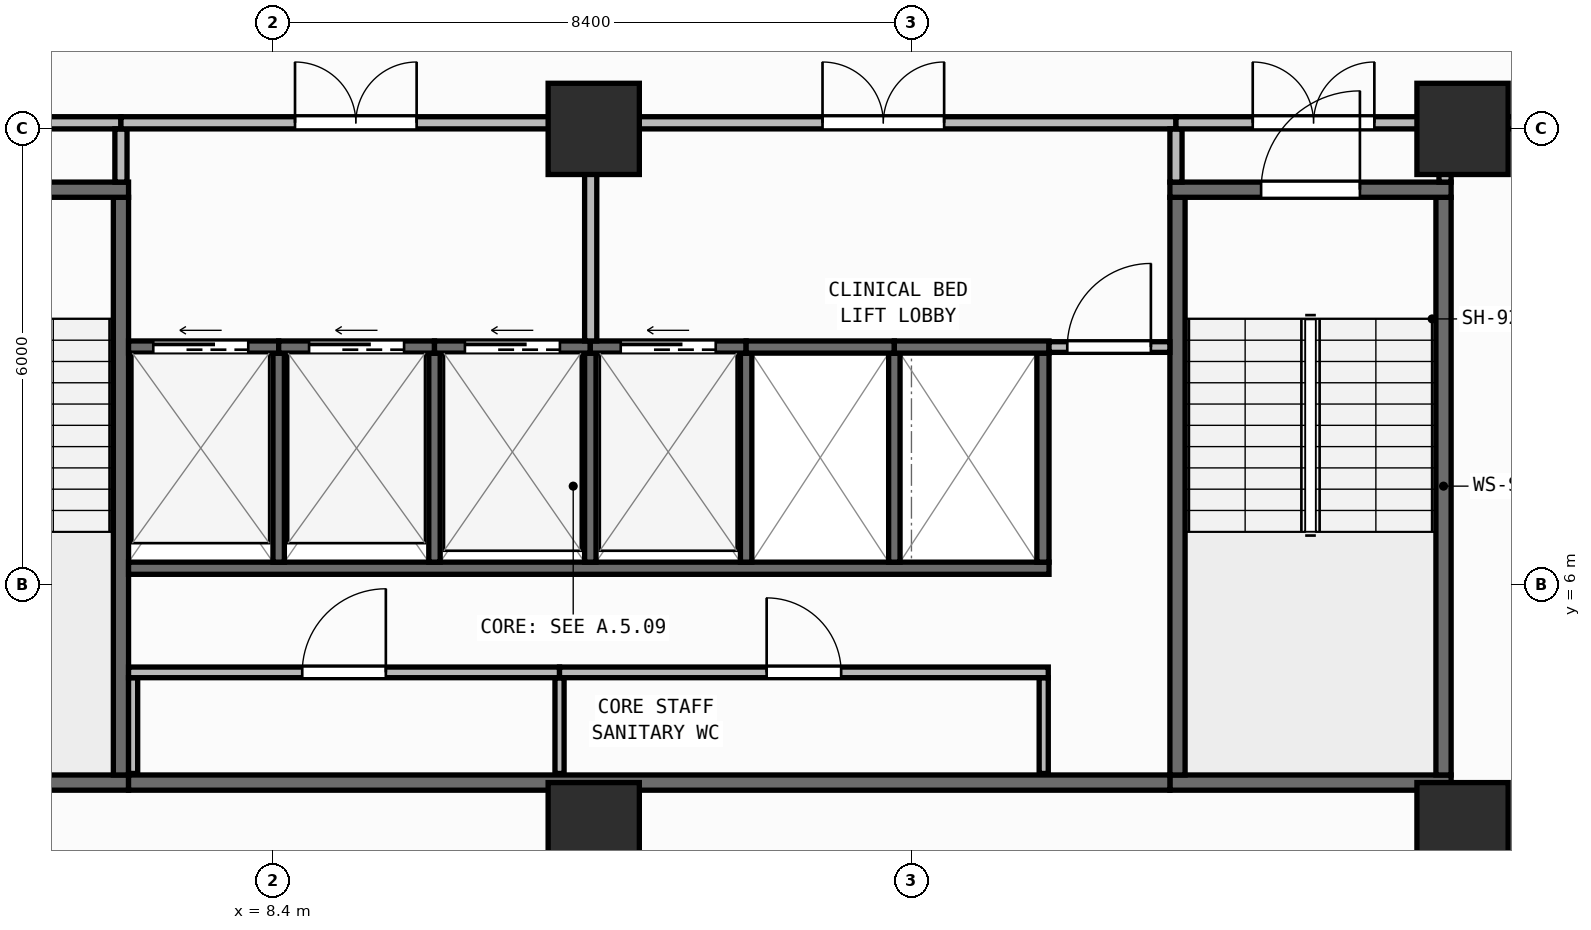
"""IFC4 building model, lengths in metres.
Left out: names, types, materials, properties, quantities, classifications, styles, units other than length and angle.
Written with IfcOpenShell. Run it as: python <this file> out.ifc"""

import sys

from ifc_helpers import new_model, si_unit, direction, frame, frame_2d, origin, origin_2d, place, context, subcontext, project, spatial, rectangle, extrude, element, fill, save


model = new_model("IFC4")
c1 = context("Model", 3, precision=1e-05, world=origin(), true_north=direction((0.0, 1.0)))
c2 = subcontext(c1, "Body", "Model", "MODEL_VIEW")
j1 = project(units=[si_unit("LENGTHUNIT", "METRE"), si_unit("PLANEANGLEUNIT", "RADIAN")], contexts=[c1])
p1 = place(None, origin())
s1 = spatial("IfcSite", under=j1, at=p1, CompositionType="ELEMENT")
p2 = place(p1, origin())
s2 = spatial("IfcBuilding", under=s1, at=p2, CompositionType="ELEMENT")
p3 = place(p2, frame((0.0, 0.0, 138.9)))
s3 = spatial("IfcBuildingStorey", under=s2, at=p3, CompositionType="ELEMENT", Elevation=138.9)
for number, where, z_axis, x_axis in (
    (1, (12.62, 2.8, 0.0), (0.0, 0.0, 1.0), (1.0, 0.0, 0.0)),
    (2, (24.05, 2.8, 0.0), (0.0, 0.0, 1.0), (1.0, 0.0, 0.0)),
    (3, (12.62, 12.0, 0.0), (0.0, 0.0, 1.0), (1.0, 0.0, 0.0)),
    (4, (24.05, 12.0, 0.0), (0.0, 0.0, 1.0), (1.0, 0.0, 0.0)),
):
    element("IfcColumn", number, at=place(p3, frame(where, z_axis=z_axis, x_axis=x_axis)), inside=s3, PredefinedType="COLUMN", context=c2, shape_type="SweptSolid", body=[
        extrude(rectangle(XDim=1.2, YDim=1.2, at=origin_2d()), origin(), (0.0, 0.0, 1.0), 3.95),
    ])
p4 = place(p3, frame((2.76, 0.173, 0.0), z_axis=(0.0, 0.0, 1.0), x_axis=(0.996857931723, 0.079210251617, 0.0)))
e5 = element("IfcWall", 5, at=p4, inside=s3, PredefinedType="STANDARD", context=c2, shape_type="SweptSolid", body=[
    extrude(rectangle(XDim=51.442, YDim=0.26, at=frame_2d((25.721, 0.0))), origin(), (0.0, 0.0, 1.0), 3.71),
])
p5 = place(p4, frame((24.521, 0.0, 0.9)))
e6 = element("IfcOpeningElement", 6, at=p5, cuts=e5, PredefinedType="OPENING", context=c2, shape_type="SweptSolid", body=[
    extrude(rectangle(XDim=2.4, YDim=1.65, at=frame_2d((1.2, 0.825))), frame((0.0, 0.14, 0.0), z_axis=(0.0, -1.0, 0.0), x_axis=(1.0, 0.0, 0.0)), (0.0, 0.0, 1.0), 0.28),
])
p6 = place(p3, frame((2.8, 3.4, 0.0), z_axis=(0.0, 0.0, 1.0), x_axis=(1.0, 0.0, 0.0)))
e7 = element("IfcWall", 7, at=p6, inside=s3, PredefinedType="SHEAR", context=c2, shape_type="SweptSolid", body=[
    extrude(rectangle(XDim=3.7, YDim=0.2, at=frame_2d((1.85, 0.0))), origin(), (0.0, 0.0, 1.0), 3.71),
])
p7 = place(p3, frame((6.4, 3.5, 0.0), z_axis=(0.0, 0.0, 1.0), x_axis=(0.0, 1.0, 0.0)))
e8 = element("IfcWall", 8, at=p7, inside=s3, PredefinedType="SHEAR", context=c2, shape_type="SweptSolid", body=[
    extrude(rectangle(XDim=7.6, YDim=0.2, at=frame_2d((3.8, 0.0))), origin(), (0.0, 0.0, 1.0), 3.71),
])
p8 = place(p3, frame((2.8, 11.2, 0.0), z_axis=(0.0, 0.0, 1.0), x_axis=(1.0, 0.0, 0.0)))
e9 = element("IfcWall", 9, at=p8, inside=s3, PredefinedType="SHEAR", context=c2, shape_type="SweptSolid", body=[
    extrude(rectangle(XDim=3.7, YDim=0.2, at=frame_2d((1.85, 0.0))), origin(), (0.0, 0.0, 1.0), 3.71),
])
p9 = place(p8, frame((1.2, 0.0, 0.0)))
e10 = element("IfcOpeningElement", 10, at=p9, cuts=e9, PredefinedType="OPENING", context=c2, shape_type="SweptSolid", body=[
    extrude(rectangle(XDim=1.3, YDim=2.15, at=frame_2d((0.65, 1.075))), frame((0.0, 0.11, 0.0), z_axis=(0.0, -1.0, 0.0), x_axis=(1.0, 0.0, 0.0)), (0.0, 0.0, 1.0), 0.22),
])
p10 = place(p3, frame((20.2, 3.4, 0.0), z_axis=(0.0, 0.0, 1.0), x_axis=(1.0, 0.0, 0.0)))
e11 = element("IfcWall", 11, at=p10, inside=s3, PredefinedType="SHEAR", context=c2, shape_type="SweptSolid", body=[
    extrude(rectangle(XDim=3.7, YDim=0.2, at=frame_2d((1.85, 0.0))), origin(), (0.0, 0.0, 1.0), 3.71),
])
for number, where, z_axis, x_axis in (
    (12, (20.3, 3.5, 0.0), (0.0, 0.0, 1.0), (0.0, 1.0, 0.0)),
    (13, (23.8, 3.5, 0.0), (0.0, 0.0, 1.0), (0.0, 1.0, 0.0)),
):
    element("IfcWall", number, at=place(p3, frame(where, z_axis=z_axis, x_axis=x_axis)), inside=s3, PredefinedType="SHEAR", context=c2, shape_type="SweptSolid", body=[
        extrude(rectangle(XDim=7.6, YDim=0.2, at=frame_2d((3.8, 0.0))), origin(), (0.0, 0.0, 1.0), 3.71),
    ])
p11 = place(p3, frame((20.2, 11.2, 0.0), z_axis=(0.0, 0.0, 1.0), x_axis=(1.0, 0.0, 0.0)))
e14 = element("IfcWall", 14, at=p11, inside=s3, PredefinedType="SHEAR", context=c2, shape_type="SweptSolid", body=[
    extrude(rectangle(XDim=3.7, YDim=0.2, at=frame_2d((1.85, 0.0))), origin(), (0.0, 0.0, 1.0), 3.71),
])
p12 = place(p11, frame((1.2, 0.0, 0.0)))
e15 = element("IfcOpeningElement", 15, at=p12, cuts=e14, PredefinedType="OPENING", context=c2, shape_type="SweptSolid", body=[
    extrude(rectangle(XDim=1.3, YDim=2.15, at=frame_2d((0.65, 1.075))), frame((0.0, 0.11, 0.0), z_axis=(0.0, -1.0, 0.0), x_axis=(1.0, 0.0, 0.0)), (0.0, 0.0, 1.0), 0.22),
])
p13 = place(p3, frame((6.5, 3.4, 0.0), z_axis=(0.0, 0.0, 1.0), x_axis=(1.0, 0.0, 0.0)))
e16 = element("IfcWall", 16, at=p13, inside=s3, PredefinedType="SHEAR", context=c2, shape_type="SweptSolid", body=[
    extrude(rectangle(XDim=13.7, YDim=0.2, at=frame_2d((6.85, 0.0))), origin(), (0.0, 0.0, 1.0), 3.71),
])
p14 = place(p3, frame((6.5, 6.22, 0.0), z_axis=(0.0, 0.0, 1.0), x_axis=(1.0, 0.0, 0.0)))
e17 = element("IfcWall", 17, at=p14, inside=s3, PredefinedType="SHEAR", context=c2, shape_type="SweptSolid", body=[
    extrude(rectangle(XDim=12.11, YDim=0.16, at=frame_2d((6.055, 0.0))), origin(), (0.0, 0.0, 1.0), 3.71),
])
p15 = place(p3, frame((18.53, 6.3, 0.0), z_axis=(0.0, 0.0, 1.0), x_axis=(0.0, 1.0, 0.0)))
e18 = element("IfcWall", 18, at=p15, inside=s3, PredefinedType="SHEAR", context=c2, shape_type="SweptSolid", body=[
    extrude(rectangle(XDim=2.75, YDim=0.16, at=frame_2d((1.375, 0.0))), origin(), (0.0, 0.0, 1.0), 3.71),
])
for number, where, z_axis, x_axis in (
    (19, (8.475, 6.3, 0.0), (0.0, 0.0, 1.0), (0.0, 1.0, 0.0)),
    (20, (10.525, 6.3, 0.0), (0.0, 0.0, 1.0), (0.0, 1.0, 0.0)),
    (21, (12.575, 6.3, 0.0), (0.0, 0.0, 1.0), (0.0, 1.0, 0.0)),
    (22, (14.625, 6.3, 0.0), (0.0, 0.0, 1.0), (0.0, 1.0, 0.0)),
    (23, (16.575, 6.3, 0.0), (0.0, 0.0, 1.0), (0.0, 1.0, 0.0)),
):
    element("IfcWall", number, at=place(p3, frame(where, z_axis=z_axis, x_axis=x_axis)), inside=s3, PredefinedType="SHEAR", context=c2, shape_type="SweptSolid", body=[
        extrude(rectangle(XDim=2.75, YDim=0.15, at=frame_2d((1.375, 0.0))), origin(), (0.0, 0.0, 1.0), 3.71),
    ])
p16 = place(p3, frame((6.5, 9.13, 0.0), z_axis=(0.0, 0.0, 1.0), x_axis=(1.0, 0.0, 0.0)))
e24 = element("IfcWall", 24, at=p16, inside=s3, PredefinedType="SHEAR", context=c2, shape_type="SweptSolid", body=[
    extrude(rectangle(XDim=1.975, YDim=0.16, at=frame_2d((0.988, 0.0))), origin(), (0.0, 0.0, 1.0), 3.71),
])
p17 = place(p16, frame((0.325, 0.0, 0.0)))
e25 = element("IfcOpeningElement", 25, at=p17, cuts=e24, PredefinedType="OPENING", context=c2, shape_type="SweptSolid", body=[
    extrude(rectangle(XDim=1.25, YDim=2.15, at=frame_2d((0.625, 1.075))), frame((0.0, 0.09, 0.0), z_axis=(0.0, -1.0, 0.0), x_axis=(1.0, 0.0, 0.0)), (0.0, 0.0, 1.0), 0.18),
])
p18 = place(p3, frame((8.475, 9.13, 0.0), z_axis=(0.0, 0.0, 1.0), x_axis=(1.0, 0.0, 0.0)))
e26 = element("IfcWall", 26, at=p18, inside=s3, PredefinedType="SHEAR", context=c2, shape_type="SweptSolid", body=[
    extrude(rectangle(XDim=2.05, YDim=0.16, at=frame_2d((1.025, 0.0))), origin(), (0.0, 0.0, 1.0), 3.71),
])
p19 = place(p18, frame((0.4, 0.0, 0.0)))
e27 = element("IfcOpeningElement", 27, at=p19, cuts=e26, PredefinedType="OPENING", context=c2, shape_type="SweptSolid", body=[
    extrude(rectangle(XDim=1.25, YDim=2.15, at=frame_2d((0.625, 1.075))), frame((0.0, 0.09, 0.0), z_axis=(0.0, -1.0, 0.0), x_axis=(1.0, 0.0, 0.0)), (0.0, 0.0, 1.0), 0.18),
])
p20 = place(p3, frame((10.525, 9.13, 0.0), z_axis=(0.0, 0.0, 1.0), x_axis=(1.0, 0.0, 0.0)))
e28 = element("IfcWall", 28, at=p20, inside=s3, PredefinedType="SHEAR", context=c2, shape_type="SweptSolid", body=[
    extrude(rectangle(XDim=2.05, YDim=0.16, at=frame_2d((1.025, 0.0))), origin(), (0.0, 0.0, 1.0), 3.71),
])
p21 = place(p20, frame((0.4, 0.0, 0.0)))
e29 = element("IfcOpeningElement", 29, at=p21, cuts=e28, PredefinedType="OPENING", context=c2, shape_type="SweptSolid", body=[
    extrude(rectangle(XDim=1.25, YDim=2.15, at=frame_2d((0.625, 1.075))), frame((0.0, 0.09, 0.0), z_axis=(0.0, -1.0, 0.0), x_axis=(1.0, 0.0, 0.0)), (0.0, 0.0, 1.0), 0.18),
])
p22 = place(p3, frame((12.575, 9.13, 0.0), z_axis=(0.0, 0.0, 1.0), x_axis=(1.0, 0.0, 0.0)))
e30 = element("IfcWall", 30, at=p22, inside=s3, PredefinedType="SHEAR", context=c2, shape_type="SweptSolid", body=[
    extrude(rectangle(XDim=2.05, YDim=0.16, at=frame_2d((1.025, 0.0))), origin(), (0.0, 0.0, 1.0), 3.71),
])
p23 = place(p22, frame((0.4, 0.0, 0.0)))
e31 = element("IfcOpeningElement", 31, at=p23, cuts=e30, PredefinedType="OPENING", context=c2, shape_type="SweptSolid", body=[
    extrude(rectangle(XDim=1.25, YDim=2.15, at=frame_2d((0.625, 1.075))), frame((0.0, 0.09, 0.0), z_axis=(0.0, -1.0, 0.0), x_axis=(1.0, 0.0, 0.0)), (0.0, 0.0, 1.0), 0.18),
])
p24 = place(p3, frame((14.625, 9.13, 0.0), z_axis=(0.0, 0.0, 1.0), x_axis=(1.0, 0.0, 0.0)))
e32 = element("IfcWall", 32, at=p24, inside=s3, PredefinedType="SHEAR", context=c2, shape_type="SweptSolid", body=[
    extrude(rectangle(XDim=1.95, YDim=0.16, at=frame_2d((0.975, 0.0))), origin(), (0.0, 0.0, 1.0), 3.71),
])
p25 = place(p3, frame((16.575, 9.13, 0.0), z_axis=(0.0, 0.0, 1.0), x_axis=(1.0, 0.0, 0.0)))
e33 = element("IfcWall", 33, at=p25, inside=s3, PredefinedType="SHEAR", context=c2, shape_type="SweptSolid", body=[
    extrude(rectangle(XDim=2.035, YDim=0.16, at=frame_2d((1.018, 0.0))), origin(), (0.0, 0.0, 1.0), 3.71),
])
for number, where, z_axis, x_axis in (
    (34, (6.56, 3.52, 0.0), (0.0, 0.0, 1.0), (0.0, 1.0, 0.0)),
    (35, (12.17, 3.52, 0.0), (0.0, 0.0, 1.0), (0.0, 1.0, 0.0)),
    (36, (18.54, 3.52, 0.0), (0.0, 0.0, 1.0), (0.0, 1.0, 0.0)),
):
    element("IfcWall", number, at=place(p3, frame(where, z_axis=z_axis, x_axis=x_axis)), inside=s3, PredefinedType="PARTITIONING", context=c2, shape_type="SweptSolid", body=[
        extrude(rectangle(XDim=1.26, YDim=0.12, at=frame_2d((0.63, 0.0))), origin(), (0.0, 0.0, 1.0), 3.71),
    ])
p26 = place(p3, frame((6.5, 4.85, 0.0), z_axis=(0.0, 0.0, 1.0), x_axis=(1.0, 0.0, 0.0)))
e37 = element("IfcWall", 37, at=p26, inside=s3, PredefinedType="PARTITIONING", context=c2, shape_type="SweptSolid", body=[
    extrude(rectangle(XDim=5.67, YDim=0.14, at=frame_2d((2.835, 0.0))), origin(), (0.0, 0.0, 1.0), 3.71),
])
p27 = place(p26, frame((2.285, 0.0, 0.0)))
e38 = element("IfcOpeningElement", 38, at=p27, cuts=e37, PredefinedType="OPENING", context=c2, shape_type="SweptSolid", body=[
    extrude(rectangle(XDim=1.1, YDim=2.1, at=frame_2d((0.55, 1.05))), frame((0.0, 0.08, 0.0), z_axis=(0.0, -1.0, 0.0), x_axis=(1.0, 0.0, 0.0)), (0.0, 0.0, 1.0), 0.16),
])
p28 = place(p3, frame((12.17, 4.85, 0.0), z_axis=(0.0, 0.0, 1.0), x_axis=(1.0, 0.0, 0.0)))
e39 = element("IfcWall", 39, at=p28, inside=s3, PredefinedType="PARTITIONING", context=c2, shape_type="SweptSolid", body=[
    extrude(rectangle(XDim=6.43, YDim=0.14, at=frame_2d((3.215, 0.0))), origin(), (0.0, 0.0, 1.0), 3.71),
])
p29 = place(p28, frame((2.725, 0.0, 0.0)))
e40 = element("IfcOpeningElement", 40, at=p29, cuts=e39, PredefinedType="OPENING", context=c2, shape_type="SweptSolid", body=[
    extrude(rectangle(XDim=0.98, YDim=2.1, at=frame_2d((0.49, 1.05))), frame((0.0, 0.08, 0.0), z_axis=(0.0, -1.0, 0.0), x_axis=(1.0, 0.0, 0.0)), (0.0, 0.0, 1.0), 0.16),
])
p30 = place(p3, frame((18.61, 9.13, 0.0), z_axis=(0.0, 0.0, 1.0), x_axis=(1.0, 0.0, 0.0)))
e41 = element("IfcWall", 41, at=p30, inside=s3, PredefinedType="PARTITIONING", context=c2, shape_type="SweptSolid", body=[
    extrude(rectangle(XDim=1.59, YDim=0.14, at=frame_2d((0.795, 0.0))), origin(), (0.0, 0.0, 1.0), 3.71),
])
p31 = place(p30, frame((0.24, 0.0, 0.0)))
e42 = element("IfcOpeningElement", 42, at=p31, cuts=e41, PredefinedType="OPENING", context=c2, shape_type="SweptSolid", body=[
    extrude(rectangle(XDim=1.1, YDim=2.1, at=frame_2d((0.55, 1.05))), frame((0.0, 0.08, 0.0), z_axis=(0.0, -1.0, 0.0), x_axis=(1.0, 0.0, 0.0)), (0.0, 0.0, 1.0), 0.16),
])
p32 = place(p3, frame((2.8, 12.08, 0.0), z_axis=(0.0, 0.0, 1.0), x_axis=(1.0, 0.0, 0.0)))
e43 = element("IfcWall", 43, at=p32, inside=s3, PredefinedType="PARTITIONING", context=c2, shape_type="SweptSolid", body=[
    extrude(rectangle(XDim=3.6, YDim=0.16, at=frame_2d((1.8, 0.0))), origin(), (0.0, 0.0, 1.0), 3.083),
])
p33 = place(p32, frame((1.0, 0.0, 0.0)))
e44 = element("IfcOpeningElement", 44, at=p33, cuts=e43, PredefinedType="OPENING", context=c2, shape_type="SweptSolid", body=[
    extrude(rectangle(XDim=1.6, YDim=2.05, at=frame_2d((0.8, 1.025))), frame((0.0, 0.09, 0.0), z_axis=(0.0, -1.0, 0.0), x_axis=(1.0, 0.0, 0.0)), (0.0, 0.0, 1.0), 0.18),
])
p34 = place(p3, frame((6.4, 11.3, 0.0), z_axis=(0.0, 0.0, 1.0), x_axis=(0.0, 1.0, 0.0)))
e45 = element("IfcWall", 45, at=p34, inside=s3, PredefinedType="PARTITIONING", context=c2, shape_type="SweptSolid", body=[
    extrude(rectangle(XDim=0.7, YDim=0.16, at=frame_2d((0.35, 0.0))), origin(), (0.0, 0.0, 1.0), 3.71),
])
p35 = place(p3, frame((6.4, 12.08, 0.0), z_axis=(0.0, 0.0, 1.0), x_axis=(1.0, 0.0, 0.0)))
e46 = element("IfcWall", 46, at=p35, inside=s3, PredefinedType="PARTITIONING", context=c2, shape_type="SweptSolid", body=[
    extrude(rectangle(XDim=6.18, YDim=0.16, at=frame_2d((3.09, 0.0))), origin(), (0.0, 0.0, 1.0), 3.083),
])
p36 = place(p35, frame((2.29, 0.0, 0.0)))
e47 = element("IfcOpeningElement", 47, at=p36, cuts=e46, PredefinedType="OPENING", context=c2, shape_type="SweptSolid", body=[
    extrude(rectangle(XDim=1.6, YDim=2.05, at=frame_2d((0.8, 1.025))), frame((0.0, 0.09, 0.0), z_axis=(0.0, -1.0, 0.0), x_axis=(1.0, 0.0, 0.0)), (0.0, 0.0, 1.0), 0.18),
])
p37 = place(p3, frame((12.58, 9.21, 0.0), z_axis=(0.0, 0.0, 1.0), x_axis=(0.0, 1.0, 0.0)))
e48 = element("IfcWall", 48, at=p37, inside=s3, PredefinedType="PARTITIONING", context=c2, shape_type="SweptSolid", body=[
    extrude(rectangle(XDim=2.79, YDim=0.16, at=frame_2d((1.395, 0.0))), origin(), (0.0, 0.0, 1.0), 3.71),
])
p38 = place(p3, frame((12.58, 12.08, 0.0), z_axis=(0.0, 0.0, 1.0), x_axis=(1.0, 0.0, 0.0)))
e49 = element("IfcWall", 49, at=p38, inside=s3, PredefinedType="PARTITIONING", context=c2, shape_type="SweptSolid", body=[
    extrude(rectangle(XDim=7.7, YDim=0.16, at=frame_2d((3.85, 0.0))), origin(), (0.0, 0.0, 1.0), 3.083),
])
p39 = place(p38, frame((3.05, 0.0, 0.0)))
e50 = element("IfcOpeningElement", 50, at=p39, cuts=e49, PredefinedType="OPENING", context=c2, shape_type="SweptSolid", body=[
    extrude(rectangle(XDim=1.6, YDim=2.05, at=frame_2d((0.8, 1.025))), frame((0.0, 0.09, 0.0), z_axis=(0.0, -1.0, 0.0), x_axis=(1.0, 0.0, 0.0)), (0.0, 0.0, 1.0), 0.18),
])
p40 = place(p3, frame((20.28, 11.3, 0.0), z_axis=(0.0, 0.0, 1.0), x_axis=(0.0, 1.0, 0.0)))
e51 = element("IfcWall", 51, at=p40, inside=s3, PredefinedType="PARTITIONING", context=c2, shape_type="SweptSolid", body=[
    extrude(rectangle(XDim=0.7, YDim=0.16, at=frame_2d((0.35, 0.0))), origin(), (0.0, 0.0, 1.0), 3.71),
])
p41 = place(p3, frame((20.28, 12.08, 0.0), z_axis=(0.0, 0.0, 1.0), x_axis=(1.0, 0.0, 0.0)))
e52 = element("IfcWall", 52, at=p41, inside=s3, PredefinedType="PARTITIONING", context=c2, shape_type="SweptSolid", body=[
    extrude(rectangle(XDim=3.62, YDim=0.16, at=frame_2d((1.81, 0.0))), origin(), (0.0, 0.0, 1.0), 3.083),
])
p42 = place(p41, frame((1.01, 0.0, 0.0)))
e53 = element("IfcOpeningElement", 53, at=p42, cuts=e52, PredefinedType="OPENING", context=c2, shape_type="SweptSolid", body=[
    extrude(rectangle(XDim=1.6, YDim=2.05, at=frame_2d((0.8, 1.025))), frame((0.0, 0.09, 0.0), z_axis=(0.0, -1.0, 0.0), x_axis=(1.0, 0.0, 0.0)), (0.0, 0.0, 1.0), 0.18),
])
p43 = place(p3, frame((23.82, 11.3, 0.0), z_axis=(0.0, 0.0, 1.0), x_axis=(0.0, 1.0, 0.0)))
e54 = element("IfcWall", 54, at=p43, inside=s3, PredefinedType="PARTITIONING", context=c2, shape_type="SweptSolid", body=[
    extrude(rectangle(XDim=0.7, YDim=0.16, at=frame_2d((0.35, 0.0))), origin(), (0.0, 0.0, 1.0), 3.71),
])
p44 = place(p3, frame((24.02, 12.08, 0.0), z_axis=(0.0, 0.0, 1.0), x_axis=(1.0, 0.0, 0.0)))
e55 = element("IfcWall", 55, at=p44, inside=s3, PredefinedType="PARTITIONING", context=c2, shape_type="SweptSolid", body=[
    extrude(rectangle(XDim=1.245, YDim=0.16, at=frame_2d((0.623, 0.0))), origin(), (0.0, 0.0, 1.0), 3.083),
])
p45 = place(p12, origin())
e56 = element("IfcDoor", 56, at=p45, inside=s3, OperationType="SINGLE_SWING_RIGHT", PredefinedType="DOOR", context=c2, shape_type="SweptSolid", body=[
    extrude(rectangle(XDim=1.3, YDim=2.15, at=frame_2d((0.65, 1.075))), frame((0.0, 0.025, 0.0), z_axis=(0.0, -1.0, 0.0), x_axis=(1.0, 0.0, 0.0)), (0.0, 0.0, 1.0), 0.05),
])
fill(e15, e56)
p46 = place(p17, origin())
e57 = element("IfcDoor", 57, at=p46, inside=s3, OperationType="SLIDING_TO_LEFT", PredefinedType="DOOR", context=c2, shape_type="SweptSolid", body=[
    extrude(rectangle(XDim=1.25, YDim=2.15, at=frame_2d((0.625, 1.075))), frame((0.0, 0.025, 0.0), z_axis=(0.0, -1.0, 0.0), x_axis=(1.0, 0.0, 0.0)), (0.0, 0.0, 1.0), 0.05),
])
fill(e25, e57)
p47 = place(p19, origin())
e58 = element("IfcDoor", 58, at=p47, inside=s3, OperationType="SLIDING_TO_LEFT", PredefinedType="DOOR", context=c2, shape_type="SweptSolid", body=[
    extrude(rectangle(XDim=1.25, YDim=2.15, at=frame_2d((0.625, 1.075))), frame((0.0, 0.025, 0.0), z_axis=(0.0, -1.0, 0.0), x_axis=(1.0, 0.0, 0.0)), (0.0, 0.0, 1.0), 0.05),
])
fill(e27, e58)
p48 = place(p21, origin())
e59 = element("IfcDoor", 59, at=p48, inside=s3, OperationType="SLIDING_TO_LEFT", PredefinedType="DOOR", context=c2, shape_type="SweptSolid", body=[
    extrude(rectangle(XDim=1.25, YDim=2.15, at=frame_2d((0.625, 1.075))), frame((0.0, 0.025, 0.0), z_axis=(0.0, -1.0, 0.0), x_axis=(1.0, 0.0, 0.0)), (0.0, 0.0, 1.0), 0.05),
])
fill(e29, e59)
p49 = place(p23, origin())
e60 = element("IfcDoor", 60, at=p49, inside=s3, OperationType="SLIDING_TO_LEFT", PredefinedType="DOOR", context=c2, shape_type="SweptSolid", body=[
    extrude(rectangle(XDim=1.25, YDim=2.15, at=frame_2d((0.625, 1.075))), frame((0.0, 0.025, 0.0), z_axis=(0.0, -1.0, 0.0), x_axis=(1.0, 0.0, 0.0)), (0.0, 0.0, 1.0), 0.05),
])
fill(e31, e60)
p50 = place(p27, origin())
e61 = element("IfcDoor", 61, at=p50, inside=s3, OperationType="SINGLE_SWING_RIGHT", PredefinedType="DOOR", context=c2, shape_type="SweptSolid", body=[
    extrude(rectangle(XDim=1.1, YDim=2.1, at=frame_2d((0.55, 1.05))), frame((0.0, 0.025, 0.0), z_axis=(0.0, -1.0, 0.0), x_axis=(1.0, 0.0, 0.0)), (0.0, 0.0, 1.0), 0.05),
])
fill(e38, e61)
p51 = place(p29, origin())
e62 = element("IfcDoor", 62, at=p51, inside=s3, OperationType="SINGLE_SWING_LEFT", PredefinedType="DOOR", context=c2, shape_type="SweptSolid", body=[
    extrude(rectangle(XDim=0.98, YDim=2.1, at=frame_2d((0.49, 1.05))), frame((0.0, 0.025, 0.0), z_axis=(0.0, -1.0, 0.0), x_axis=(1.0, 0.0, 0.0)), (0.0, 0.0, 1.0), 0.05),
])
fill(e40, e62)
p52 = place(p31, origin())
e63 = element("IfcDoor", 63, at=p52, inside=s3, OperationType="SINGLE_SWING_RIGHT", PredefinedType="DOOR", context=c2, shape_type="SweptSolid", body=[
    extrude(rectangle(XDim=1.1, YDim=2.1, at=frame_2d((0.55, 1.05))), frame((0.0, 0.025, 0.0), z_axis=(0.0, -1.0, 0.0), x_axis=(1.0, 0.0, 0.0)), (0.0, 0.0, 1.0), 0.05),
])
fill(e42, e63)
p53 = place(p36, origin())
e64 = element("IfcDoor", 64, at=p53, inside=s3, OperationType="DOUBLE_DOOR_SINGLE_SWING", PredefinedType="DOOR", context=c2, shape_type="SweptSolid", body=[
    extrude(rectangle(XDim=1.6, YDim=2.05, at=frame_2d((0.8, 1.025))), frame((0.0, 0.025, 0.0), z_axis=(0.0, -1.0, 0.0), x_axis=(1.0, 0.0, 0.0)), (0.0, 0.0, 1.0), 0.05),
])
fill(e47, e64)
p54 = place(p39, origin())
e65 = element("IfcDoor", 65, at=p54, inside=s3, OperationType="DOUBLE_DOOR_SINGLE_SWING", PredefinedType="DOOR", context=c2, shape_type="SweptSolid", body=[
    extrude(rectangle(XDim=1.6, YDim=2.05, at=frame_2d((0.8, 1.025))), frame((0.0, 0.025, 0.0), z_axis=(0.0, -1.0, 0.0), x_axis=(1.0, 0.0, 0.0)), (0.0, 0.0, 1.0), 0.05),
])
fill(e50, e65)
p55 = place(p42, origin())
e66 = element("IfcDoor", 66, at=p55, inside=s3, OperationType="DOUBLE_DOOR_SINGLE_SWING", PredefinedType="DOOR", context=c2, shape_type="SweptSolid", body=[
    extrude(rectangle(XDim=1.6, YDim=2.05, at=frame_2d((0.8, 1.025))), frame((0.0, 0.025, 0.0), z_axis=(0.0, -1.0, 0.0), x_axis=(1.0, 0.0, 0.0)), (0.0, 0.0, 1.0), 0.05),
])
fill(e53, e66)
save(model, sys.argv[1])
